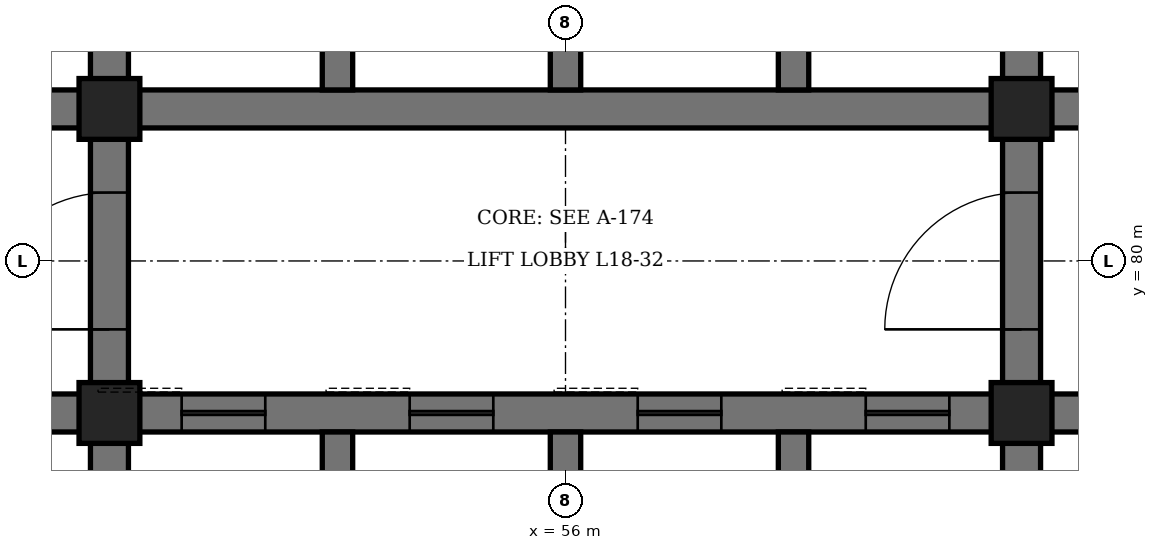
"""IFC4 building model, lengths in metres.
Left out: names, types, materials, properties, quantities, classifications, styles, units other than length and angle.
Written with IfcOpenShell. Run it as: python <this file> out.ifc"""

import sys

from ifc_helpers import new_model, si_unit, direction, frame, frame_2d, origin, origin_2d, place, context, subcontext, project, spatial, rectangle, hollow_rectangle, extrude, element, fill, save


model = new_model("IFC4")
c1 = context("Model", 3, precision=1e-05, world=origin(), true_north=direction((0.0, 1.0)))
c2 = subcontext(c1, "Body", "Model", "MODEL_VIEW")
j1 = project(units=[si_unit("LENGTHUNIT", "METRE"), si_unit("PLANEANGLEUNIT", "RADIAN")], contexts=[c1])
p1 = place(None, origin())
s1 = spatial("IfcSite", under=j1, at=p1, CompositionType="ELEMENT")
p2 = place(p1, origin())
s2 = spatial("IfcBuilding", under=s1, at=p2, CompositionType="ELEMENT")
p3 = place(p2, frame((0.0, 0.0, 85.3)))
s3 = spatial("IfcBuildingStorey", under=s2, at=p3, CompositionType="ELEMENT", Elevation=85.3)
p4 = place(p3, frame((50.0, 71.6, 0.0), z_axis=(0.0, 0.0, 1.0), x_axis=(0.0, 1.0, 0.0)))
e1 = element("IfcWall", 1, at=p4, inside=s3, PredefinedType="SHEAR", context=c2, shape_type="SweptSolid", body=[
    extrude(rectangle(XDim=16.8, YDim=0.5, at=frame_2d((8.4, 0.0))), origin(), (0.0, 0.0, 1.0), 4.2),
])
p5 = place(p4, frame((7.5, 0.0, 0.0)))
e2 = element("IfcOpeningElement", 2, at=p5, cuts=e1, PredefinedType="OPENING", context=c2, shape_type="SweptSolid", body=[
    extrude(rectangle(XDim=1.8, YDim=2.4, at=frame_2d((0.9, 1.2))), frame((0.0, 0.26, 0.0), z_axis=(0.0, -1.0, 0.0), x_axis=(1.0, 0.0, 0.0)), (0.0, 0.0, 1.0), 0.52),
])
p6 = place(p3, frame((62.0, 71.6, 0.0), z_axis=(0.0, 0.0, 1.0), x_axis=(0.0, 1.0, 0.0)))
e3 = element("IfcWall", 3, at=p6, inside=s3, PredefinedType="SHEAR", context=c2, shape_type="SweptSolid", body=[
    extrude(rectangle(XDim=16.8, YDim=0.5, at=frame_2d((8.4, 0.0))), origin(), (0.0, 0.0, 1.0), 4.2),
])
p7 = place(p6, frame((7.5, 0.0, 0.0)))
e4 = element("IfcOpeningElement", 4, at=p7, cuts=e3, PredefinedType="OPENING", context=c2, shape_type="SweptSolid", body=[
    extrude(rectangle(XDim=1.8, YDim=2.4, at=frame_2d((0.9, 1.2))), frame((0.0, 0.26, 0.0), z_axis=(0.0, -1.0, 0.0), x_axis=(1.0, 0.0, 0.0)), (0.0, 0.0, 1.0), 0.52),
])
p8 = place(p3, frame((44.6, 78.0, 0.0), z_axis=(0.0, 0.0, 1.0), x_axis=(1.0, 0.0, 0.0)))
e5 = element("IfcWall", 5, at=p8, inside=s3, PredefinedType="SHEAR", context=c2, shape_type="SweptSolid", body=[
    extrude(rectangle(XDim=5.15, YDim=0.5, at=frame_2d((2.575, 0.0))), origin(), (0.0, 0.0, 1.0), 4.2),
])
p9 = place(p8, frame((1.8, 0.0, 0.0)))
e6 = element("IfcOpeningElement", 6, at=p9, cuts=e5, PredefinedType="OPENING", context=c2, shape_type="SweptSolid", body=[
    extrude(rectangle(XDim=1.2, YDim=2.1, at=frame_2d((0.6, 1.05))), frame((0.0, 0.26, 0.0), z_axis=(0.0, -1.0, 0.0), x_axis=(1.0, 0.0, 0.0)), (0.0, 0.0, 1.0), 0.52),
])
p10 = place(p3, frame((44.6, 82.0, 0.0), z_axis=(0.0, 0.0, 1.0), x_axis=(1.0, 0.0, 0.0)))
e7 = element("IfcWall", 7, at=p10, inside=s3, PredefinedType="SHEAR", context=c2, shape_type="SweptSolid", body=[
    extrude(rectangle(XDim=5.15, YDim=0.5, at=frame_2d((2.575, 0.0))), origin(), (0.0, 0.0, 1.0), 4.2),
])
p11 = place(p10, frame((0.7, 0.0, 0.0)))
e8 = element("IfcOpeningElement", 8, at=p11, cuts=e7, PredefinedType="OPENING", context=c2, shape_type="SweptSolid", body=[
    extrude(rectangle(XDim=0.9, YDim=2.1, at=frame_2d((0.45, 1.05))), frame((0.0, 0.26, 0.0), z_axis=(0.0, -1.0, 0.0), x_axis=(1.0, 0.0, 0.0)), (0.0, 0.0, 1.0), 0.52),
])
p12 = place(p3, frame((62.25, 78.0, 0.0), z_axis=(0.0, 0.0, 1.0), x_axis=(1.0, 0.0, 0.0)))
e9 = element("IfcWall", 9, at=p12, inside=s3, PredefinedType="SHEAR", context=c2, shape_type="SweptSolid", body=[
    extrude(rectangle(XDim=5.15, YDim=0.5, at=frame_2d((2.575, 0.0))), origin(), (0.0, 0.0, 1.0), 4.2),
])
p13 = place(p12, frame((2.15, 0.0, 0.0)))
e10 = element("IfcOpeningElement", 10, at=p13, cuts=e9, PredefinedType="OPENING", context=c2, shape_type="SweptSolid", body=[
    extrude(rectangle(XDim=1.2, YDim=2.1, at=frame_2d((0.6, 1.05))), frame((0.0, 0.26, 0.0), z_axis=(0.0, -1.0, 0.0), x_axis=(1.0, 0.0, 0.0)), (0.0, 0.0, 1.0), 0.52),
])
p14 = place(p3, frame((62.25, 82.0, 0.0), z_axis=(0.0, 0.0, 1.0), x_axis=(1.0, 0.0, 0.0)))
e11 = element("IfcWall", 11, at=p14, inside=s3, PredefinedType="SHEAR", context=c2, shape_type="SweptSolid", body=[
    extrude(rectangle(XDim=5.15, YDim=0.5, at=frame_2d((2.575, 0.0))), origin(), (0.0, 0.0, 1.0), 4.2),
])
p15 = place(p14, frame((2.15, 0.0, 0.0)))
e12 = element("IfcOpeningElement", 12, at=p15, cuts=e11, PredefinedType="OPENING", context=c2, shape_type="SweptSolid", body=[
    extrude(rectangle(XDim=1.2, YDim=2.1, at=frame_2d((0.6, 1.05))), frame((0.0, 0.26, 0.0), z_axis=(0.0, -1.0, 0.0), x_axis=(1.0, 0.0, 0.0)), (0.0, 0.0, 1.0), 0.52),
])
p16 = place(p3, frame((50.25, 78.0, 0.0), z_axis=(0.0, 0.0, 1.0), x_axis=(1.0, 0.0, 0.0)))
e13 = element("IfcWall", 13, at=p16, inside=s3, PredefinedType="SHEAR", context=c2, shape_type="SweptSolid", body=[
    extrude(rectangle(XDim=11.5, YDim=0.5, at=frame_2d((5.75, 0.0))), origin(), (0.0, 0.0, 1.0), 4.2),
])
p17 = place(p16, frame((0.7, 0.0, 0.0)))
e14 = element("IfcOpeningElement", 14, at=p17, cuts=e13, PredefinedType="OPENING", context=c2, shape_type="SweptSolid", body=[
    extrude(rectangle(XDim=1.1, YDim=2.2, at=frame_2d((0.55, 1.1))), frame((0.0, 0.26, 0.0), z_axis=(0.0, -1.0, 0.0), x_axis=(1.0, 0.0, 0.0)), (0.0, 0.0, 1.0), 0.52),
])
p18 = place(p16, frame((3.7, 0.0, 0.0)))
e15 = element("IfcOpeningElement", 15, at=p18, cuts=e13, PredefinedType="OPENING", context=c2, shape_type="SweptSolid", body=[
    extrude(rectangle(XDim=1.1, YDim=2.2, at=frame_2d((0.55, 1.1))), frame((0.0, 0.26, 0.0), z_axis=(0.0, -1.0, 0.0), x_axis=(1.0, 0.0, 0.0)), (0.0, 0.0, 1.0), 0.52),
])
p19 = place(p16, frame((6.7, 0.0, 0.0)))
e16 = element("IfcOpeningElement", 16, at=p19, cuts=e13, PredefinedType="OPENING", context=c2, shape_type="SweptSolid", body=[
    extrude(rectangle(XDim=1.1, YDim=2.2, at=frame_2d((0.55, 1.1))), frame((0.0, 0.26, 0.0), z_axis=(0.0, -1.0, 0.0), x_axis=(1.0, 0.0, 0.0)), (0.0, 0.0, 1.0), 0.52),
])
p20 = place(p16, frame((9.7, 0.0, 0.0)))
e17 = element("IfcOpeningElement", 17, at=p20, cuts=e13, PredefinedType="OPENING", context=c2, shape_type="SweptSolid", body=[
    extrude(rectangle(XDim=1.1, YDim=2.2, at=frame_2d((0.55, 1.1))), frame((0.0, 0.26, 0.0), z_axis=(0.0, -1.0, 0.0), x_axis=(1.0, 0.0, 0.0)), (0.0, 0.0, 1.0), 0.52),
])
p21 = place(p3, frame((50.25, 82.0, 0.0), z_axis=(0.0, 0.0, 1.0), x_axis=(1.0, 0.0, 0.0)))
e18 = element("IfcWall", 18, at=p21, inside=s3, PredefinedType="SHEAR", context=c2, shape_type="SweptSolid", body=[
    extrude(rectangle(XDim=11.5, YDim=0.5, at=frame_2d((5.75, 0.0))), origin(), (0.0, 0.0, 1.0), 4.2),
])
p22 = place(p3, frame((53.0, 74.2, 0.0), z_axis=(0.0, 0.0, 1.0), x_axis=(0.0, 1.0, 0.0)))
e19 = element("IfcWall", 19, at=p22, inside=s3, PredefinedType="SHEAR", context=c2, shape_type="SweptSolid", body=[
    extrude(rectangle(XDim=3.55, YDim=0.4, at=frame_2d((1.775, 0.0))), origin(), (0.0, 0.0, 1.0), 4.2),
])
p23 = place(p3, frame((53.0, 82.25, 0.0), z_axis=(0.0, 0.0, 1.0), x_axis=(0.0, 1.0, 0.0)))
e20 = element("IfcWall", 20, at=p23, inside=s3, PredefinedType="SHEAR", context=c2, shape_type="SweptSolid", body=[
    extrude(rectangle(XDim=3.5, YDim=0.4, at=frame_2d((1.75, 0.0))), origin(), (0.0, 0.0, 1.0), 4.2),
])
p24 = place(p3, frame((56.0, 74.2, 0.0), z_axis=(0.0, 0.0, 1.0), x_axis=(0.0, 1.0, 0.0)))
e21 = element("IfcWall", 21, at=p24, inside=s3, PredefinedType="SHEAR", context=c2, shape_type="SweptSolid", body=[
    extrude(rectangle(XDim=3.55, YDim=0.4, at=frame_2d((1.775, 0.0))), origin(), (0.0, 0.0, 1.0), 4.2),
])
p25 = place(p3, frame((56.0, 82.25, 0.0), z_axis=(0.0, 0.0, 1.0), x_axis=(0.0, 1.0, 0.0)))
e22 = element("IfcWall", 22, at=p25, inside=s3, PredefinedType="SHEAR", context=c2, shape_type="SweptSolid", body=[
    extrude(rectangle(XDim=3.5, YDim=0.4, at=frame_2d((1.75, 0.0))), origin(), (0.0, 0.0, 1.0), 4.2),
])
p26 = place(p3, frame((59.0, 74.2, 0.0), z_axis=(0.0, 0.0, 1.0), x_axis=(0.0, 1.0, 0.0)))
e23 = element("IfcWall", 23, at=p26, inside=s3, PredefinedType="SHEAR", context=c2, shape_type="SweptSolid", body=[
    extrude(rectangle(XDim=3.55, YDim=0.4, at=frame_2d((1.775, 0.0))), origin(), (0.0, 0.0, 1.0), 4.2),
])
p27 = place(p3, frame((59.0, 82.25, 0.0), z_axis=(0.0, 0.0, 1.0), x_axis=(0.0, 1.0, 0.0)))
e24 = element("IfcWall", 24, at=p27, inside=s3, PredefinedType="SHEAR", context=c2, shape_type="SweptSolid", body=[
    extrude(rectangle(XDim=3.5, YDim=0.4, at=frame_2d((1.75, 0.0))), origin(), (0.0, 0.0, 1.0), 4.2),
])
for number, where, z_axis, x_axis in (
    (25, (50.0, 78.0, 0.0), (0.0, 0.0, 1.0), (1.0, 0.0, 0.0)),
    (26, (50.0, 82.0, 0.0), (0.0, 0.0, 1.0), (1.0, 0.0, 0.0)),
    (27, (62.0, 78.0, 0.0), (0.0, 0.0, 1.0), (1.0, 0.0, 0.0)),
    (28, (62.0, 82.0, 0.0), (0.0, 0.0, 1.0), (1.0, 0.0, 0.0)),
):
    element("IfcColumn", number, at=place(p3, frame(where, z_axis=z_axis, x_axis=x_axis)), inside=s3, PredefinedType="COLUMN", context=c2, shape_type="SweptSolid", body=[
        extrude(hollow_rectangle(XDim=0.8, YDim=0.8, WallThickness=0.1, at=origin_2d()), origin(), (0.0, 0.0, 1.0), 4.2),
    ])
p28 = place(p5, origin())
e29 = element("IfcDoor", 29, at=p28, inside=s3, OperationType="DOUBLE_DOOR_SINGLE_SWING", PredefinedType="DOOR", context=c2, shape_type="SweptSolid", body=[
    extrude(rectangle(XDim=1.8, YDim=2.4, at=frame_2d((0.9, 1.2))), frame((0.0, 0.25, 0.0), z_axis=(0.0, -1.0, 0.0), x_axis=(1.0, 0.0, 0.0)), (0.0, 0.0, 1.0), 0.5),
])
fill(e2, e29)
p29 = place(p7, origin())
e30 = element("IfcDoor", 30, at=p29, inside=s3, OperationType="DOUBLE_DOOR_SINGLE_SWING", PredefinedType="DOOR", context=c2, shape_type="SweptSolid", body=[
    extrude(rectangle(XDim=1.8, YDim=2.4, at=frame_2d((0.9, 1.2))), frame((0.0, 0.25, 0.0), z_axis=(0.0, -1.0, 0.0), x_axis=(1.0, 0.0, 0.0)), (0.0, 0.0, 1.0), 0.5),
])
fill(e4, e30)
p30 = place(p17, origin())
e31 = element("IfcDoor", 31, at=p30, inside=s3, OperationType="SLIDING_TO_LEFT", PredefinedType="DOOR", context=c2, shape_type="SweptSolid", body=[
    extrude(rectangle(XDim=1.1, YDim=2.2, at=frame_2d((0.55, 1.1))), frame((0.0, 0.25, 0.0), z_axis=(0.0, -1.0, 0.0), x_axis=(1.0, 0.0, 0.0)), (0.0, 0.0, 1.0), 0.5),
])
fill(e14, e31)
p31 = place(p18, origin())
e32 = element("IfcDoor", 32, at=p31, inside=s3, OperationType="SLIDING_TO_LEFT", PredefinedType="DOOR", context=c2, shape_type="SweptSolid", body=[
    extrude(rectangle(XDim=1.1, YDim=2.2, at=frame_2d((0.55, 1.1))), frame((0.0, 0.25, 0.0), z_axis=(0.0, -1.0, 0.0), x_axis=(1.0, 0.0, 0.0)), (0.0, 0.0, 1.0), 0.5),
])
fill(e15, e32)
p32 = place(p19, origin())
e33 = element("IfcDoor", 33, at=p32, inside=s3, OperationType="SLIDING_TO_LEFT", PredefinedType="DOOR", context=c2, shape_type="SweptSolid", body=[
    extrude(rectangle(XDim=1.1, YDim=2.2, at=frame_2d((0.55, 1.1))), frame((0.0, 0.25, 0.0), z_axis=(0.0, -1.0, 0.0), x_axis=(1.0, 0.0, 0.0)), (0.0, 0.0, 1.0), 0.5),
])
fill(e16, e33)
p33 = place(p20, origin())
e34 = element("IfcDoor", 34, at=p33, inside=s3, OperationType="SLIDING_TO_LEFT", PredefinedType="DOOR", context=c2, shape_type="SweptSolid", body=[
    extrude(rectangle(XDim=1.1, YDim=2.2, at=frame_2d((0.55, 1.1))), frame((0.0, 0.25, 0.0), z_axis=(0.0, -1.0, 0.0), x_axis=(1.0, 0.0, 0.0)), (0.0, 0.0, 1.0), 0.5),
])
fill(e17, e34)
save(model, sys.argv[1])
